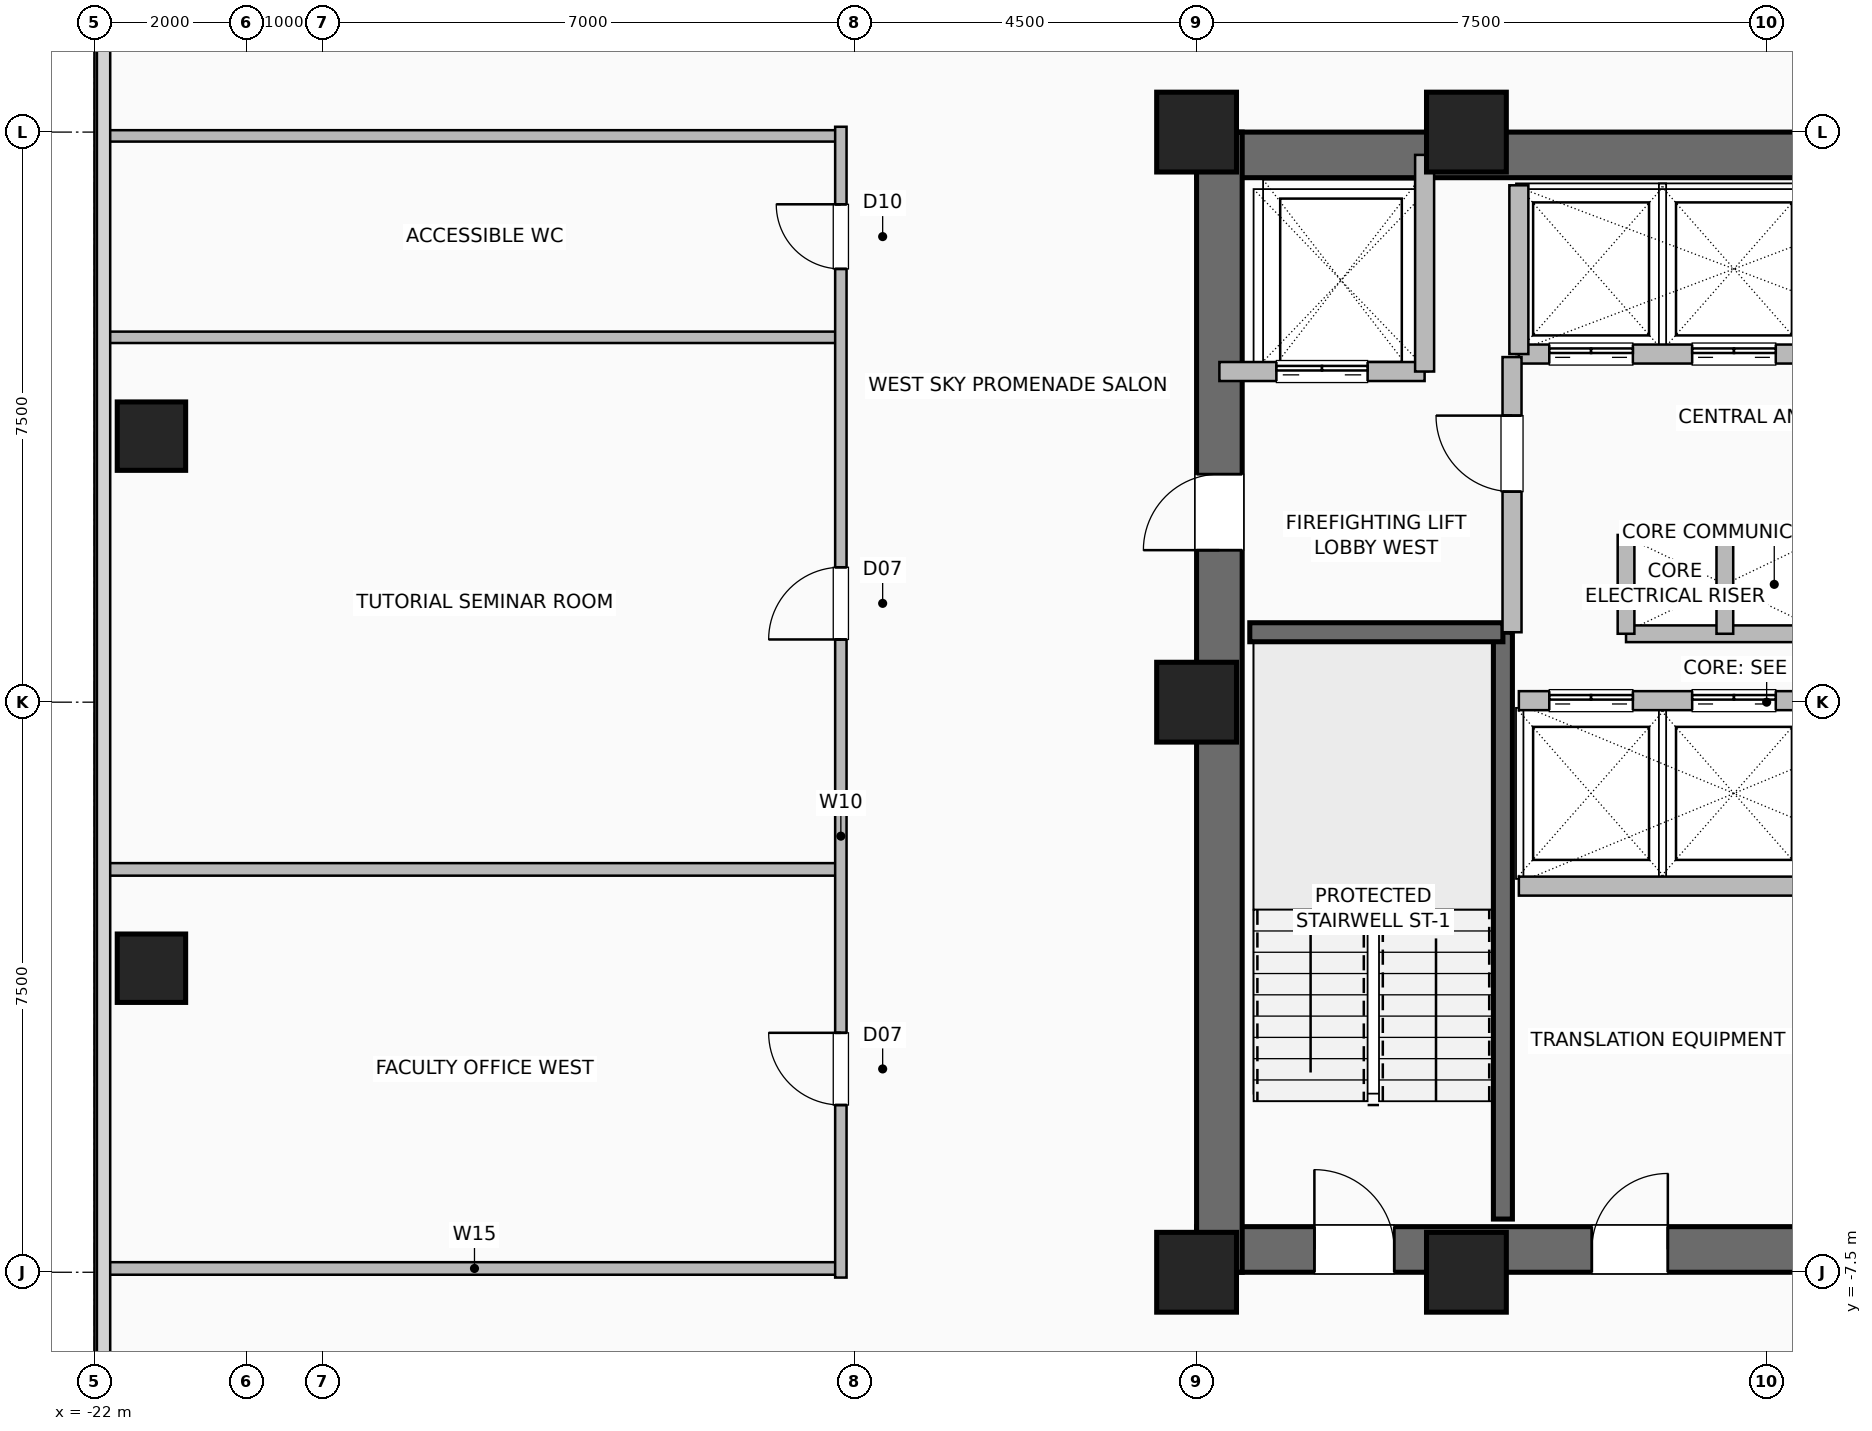
"""IFC4 building model, lengths in metres.
Left out: names, types, materials, properties, quantities, classifications, styles, units other than length and angle.
Written with IfcOpenShell. Run it as: python <this file> out.ifc"""

import sys

from ifc_helpers import new_model, si_unit, direction, frame, frame_2d, origin, origin_2d, place, context, subcontext, project, spatial, rectangle, hollow_rectangle, extrude, element, fill, save


model = new_model("IFC4")
c1 = context("Model", 3, precision=1e-05, world=origin(), true_north=direction((0.0, 1.0)))
c2 = subcontext(c1, "Body", "Model", "MODEL_VIEW")
j1 = project(units=[si_unit("LENGTHUNIT", "METRE"), si_unit("PLANEANGLEUNIT", "RADIAN")], contexts=[c1])
p1 = place(None, origin())
s1 = spatial("IfcSite", under=j1, at=p1, CompositionType="ELEMENT")
p2 = place(p1, origin())
s2 = spatial("IfcBuilding", under=s1, at=p2, CompositionType="ELEMENT")
p3 = place(p2, frame((0.0, 0.0, 133.6)))
s3 = spatial("IfcBuildingStorey", under=s2, at=p3, CompositionType="ELEMENT", Elevation=133.6)
for number, where, z_axis, x_axis in (
    (1, (-7.5, -7.5, 0.0), (0.0, 0.0, 1.0), (1.0, 0.0, 0.0)),
    (2, (-3.95, -7.5, 0.0), (0.0, 0.0, 1.0), (1.0, 0.0, 0.0)),
    (3, (-3.95, 7.5, 0.0), (0.0, 0.0, 1.0), (1.0, 0.0, 0.0)),
    (4, (-7.5, 7.5, 0.0), (0.0, 0.0, 1.0), (1.0, 0.0, 0.0)),
    (5, (-7.5, 0.0, 0.0), (0.0, 0.0, 1.0), (1.0, 0.0, 0.0)),
):
    element("IfcColumn", number, at=place(p3, frame(where, z_axis=z_axis, x_axis=x_axis)), inside=s3, PredefinedType="COLUMN", context=c2, shape_type="SweptSolid", body=[
        extrude(hollow_rectangle(XDim=1.05, YDim=1.05, WallThickness=0.05, at=origin_2d()), origin(), (0.0, 0.0, 1.0), 3.6),
    ])
for number, where, z_axis, x_axis in (
    (6, (-21.25, -3.5, 0.0), (0.0, 0.0, 1.0), (1.0, 0.0, 0.0)),
    (7, (-21.25, 3.5, 0.0), (0.0, 0.0, 1.0), (1.0, 0.0, 0.0)),
):
    element("IfcColumn", number, at=place(p3, frame(where, z_axis=z_axis, x_axis=x_axis)), inside=s3, PredefinedType="COLUMN", context=c2, shape_type="SweptSolid", body=[
        extrude(hollow_rectangle(XDim=0.9, YDim=0.9, WallThickness=0.045, at=origin_2d()), origin(), (0.0, 0.0, 1.0), 3.6),
    ])
p4 = place(p3, frame((-7.5, -7.2, 0.0), z_axis=(0.0, 0.0, 1.0), x_axis=(1.0, 0.0, 0.0)))
e8 = element("IfcWall", 8, at=p4, inside=s3, PredefinedType="SHEAR", context=c2, shape_type="SweptSolid", body=[
    extrude(rectangle(XDim=15.0, YDim=0.6, at=frame_2d((7.5, 0.0))), origin(), (0.0, 0.0, 1.0), 3.36),
])
p5 = place(p4, frame((1.55, 0.0, 0.0)))
e9 = element("IfcOpeningElement", 9, at=p5, cuts=e8, PredefinedType="OPENING", context=c2, shape_type="SweptSolid", body=[
    extrude(rectangle(XDim=1.05, YDim=2.08, at=frame_2d((0.525, 1.04))), frame((0.0, 0.31, 0.0), z_axis=(0.0, -1.0, 0.0), x_axis=(1.0, 0.0, 0.0)), (0.0, 0.0, 1.0), 0.62),
])
p6 = place(p4, frame((12.4, 0.0, 0.0)))
e10 = element("IfcOpeningElement", 10, at=p6, cuts=e8, PredefinedType="OPENING", context=c2, shape_type="SweptSolid", body=[
    extrude(rectangle(XDim=1.05, YDim=2.08, at=frame_2d((0.525, 1.04))), frame((0.0, 0.31, 0.0), z_axis=(0.0, -1.0, 0.0), x_axis=(1.0, 0.0, 0.0)), (0.0, 0.0, 1.0), 0.62),
])
p7 = place(p4, frame((5.2, 0.0, 0.0)))
e11 = element("IfcOpeningElement", 11, at=p7, cuts=e8, PredefinedType="OPENING", context=c2, shape_type="SweptSolid", body=[
    extrude(rectangle(XDim=1.0, YDim=2.08, at=frame_2d((0.5, 1.04))), frame((0.0, 0.31, 0.0), z_axis=(0.0, -1.0, 0.0), x_axis=(1.0, 0.0, 0.0)), (0.0, 0.0, 1.0), 0.62),
])
p8 = place(p4, frame((8.65, 0.0, 0.0)))
e12 = element("IfcOpeningElement", 12, at=p8, cuts=e8, PredefinedType="OPENING", context=c2, shape_type="SweptSolid", body=[
    extrude(rectangle(XDim=1.0, YDim=2.08, at=frame_2d((0.5, 1.04))), frame((0.0, 0.31, 0.0), z_axis=(0.0, -1.0, 0.0), x_axis=(1.0, 0.0, 0.0)), (0.0, 0.0, 1.0), 0.62),
])
p9 = place(p3, frame((-7.5, 7.2, 0.0), z_axis=(0.0, 0.0, 1.0), x_axis=(1.0, 0.0, 0.0)))
e13 = element("IfcWall", 13, at=p9, inside=s3, PredefinedType="SHEAR", context=c2, shape_type="SweptSolid", body=[
    extrude(rectangle(XDim=15.0, YDim=0.6, at=frame_2d((7.5, 0.0))), origin(), (0.0, 0.0, 1.0), 3.36),
])
p10 = place(p3, frame((-7.2, -7.5, 0.0), z_axis=(0.0, 0.0, 1.0), x_axis=(0.0, 1.0, 0.0)))
e14 = element("IfcWall", 14, at=p10, inside=s3, PredefinedType="SHEAR", context=c2, shape_type="SweptSolid", body=[
    extrude(rectangle(XDim=15.0, YDim=0.6, at=frame_2d((7.5, 0.0))), origin(), (0.0, 0.0, 1.0), 3.36),
])
p11 = place(p10, frame((9.5, 0.0, 0.0)))
e15 = element("IfcOpeningElement", 15, at=p11, cuts=e14, PredefinedType="OPENING", context=c2, shape_type="SweptSolid", body=[
    extrude(rectangle(XDim=1.0, YDim=2.08, at=frame_2d((0.5, 1.04))), frame((0.0, 0.31, 0.0), z_axis=(0.0, -1.0, 0.0), x_axis=(1.0, 0.0, 0.0)), (0.0, 0.0, 1.0), 0.62),
])
p12 = place(p3, frame((-3.47, -6.8, 0.0), z_axis=(0.0, 0.0, 1.0), x_axis=(0.0, 1.0, 0.0)))
e16 = element("IfcWall", 16, at=p12, inside=s3, PredefinedType="SHEAR", context=c2, shape_type="SweptSolid", body=[
    extrude(rectangle(XDim=7.72, YDim=0.25, at=frame_2d((3.86, 0.0))), origin(), (0.0, 0.0, 1.0), 3.36),
])
p13 = place(p3, frame((-6.8, 0.92, 0.0), z_axis=(0.0, 0.0, 1.0), x_axis=(1.0, 0.0, 0.0)))
e17 = element("IfcWall", 17, at=p13, inside=s3, PredefinedType="SHEAR", context=c2, shape_type="SweptSolid", body=[
    extrude(rectangle(XDim=3.33, YDim=0.25, at=frame_2d((1.665, 0.0))), origin(), (0.0, 0.0, 1.0), 3.36),
])
for number, where, z_axis, x_axis in (
    (18, (-1.85, 2.2, 0.0), (0.0, 0.0, 1.0), (1.0, 0.0, 0.0)),
    (19, (-1.85, 0.9, 0.0), (0.0, 0.0, 1.0), (1.0, 0.0, 0.0)),
):
    element("IfcWall", number, at=place(p3, frame(where, z_axis=z_axis, x_axis=x_axis)), inside=s3, PredefinedType="PARTITIONING", context=c2, shape_type="SweptSolid", body=[
        extrude(rectangle(XDim=2.6, YDim=0.22, at=frame_2d((1.3, 0.0))), origin(), (0.0, 0.0, 1.0), 3.36),
    ])
for number, where, z_axis, x_axis in (
    (20, (-0.55, 0.9, 0.0), (0.0, 0.0, 1.0), (0.0, 1.0, 0.0)),
    (21, (-1.85, 0.9, 0.0), (0.0, 0.0, 1.0), (0.0, 1.0, 0.0)),
):
    element("IfcWall", number, at=place(p3, frame(where, z_axis=z_axis, x_axis=x_axis)), inside=s3, PredefinedType="PARTITIONING", context=c2, shape_type="SweptSolid", body=[
        extrude(rectangle(XDim=1.3, YDim=0.22, at=frame_2d((0.65, 0.0))), origin(), (0.0, 0.0, 1.0), 3.36),
    ])
p14 = place(p3, frame((-3.26, 0.02, 0.0), z_axis=(0.0, 0.0, 1.0), x_axis=(1.0, 0.0, 0.0)))
e22 = element("IfcWall", 22, at=p14, inside=s3, PredefinedType="SHEAR", context=c2, shape_type="SweptSolid", body=[
    extrude(rectangle(XDim=5.64, YDim=0.25, at=frame_2d((2.82, 0.0))), origin(), (0.0, 0.0, 1.0), 3.36),
])
p15 = place(p14, frame((0.4, 0.0, 0.0)))
e23 = element("IfcOpeningElement", 23, at=p15, cuts=e22, PredefinedType="OPENING", context=c2, shape_type="SweptSolid", body=[
    extrude(rectangle(XDim=1.1, YDim=2.2, at=frame_2d((0.55, 1.1))), frame((0.0, 0.135, 0.0), z_axis=(0.0, -1.0, 0.0), x_axis=(1.0, 0.0, 0.0)), (0.0, 0.0, 1.0), 0.27),
])
p16 = place(p14, frame((2.28, 0.0, 0.0)))
e24 = element("IfcOpeningElement", 24, at=p16, cuts=e22, PredefinedType="OPENING", context=c2, shape_type="SweptSolid", body=[
    extrude(rectangle(XDim=1.1, YDim=2.2, at=frame_2d((0.55, 1.1))), frame((0.0, 0.135, 0.0), z_axis=(0.0, -1.0, 0.0), x_axis=(1.0, 0.0, 0.0)), (0.0, 0.0, 1.0), 0.27),
])
p17 = place(p14, frame((4.16, 0.0, 0.0)))
e25 = element("IfcOpeningElement", 25, at=p17, cuts=e22, PredefinedType="OPENING", context=c2, shape_type="SweptSolid", body=[
    extrude(rectangle(XDim=1.1, YDim=2.2, at=frame_2d((0.55, 1.1))), frame((0.0, 0.135, 0.0), z_axis=(0.0, -1.0, 0.0), x_axis=(1.0, 0.0, 0.0)), (0.0, 0.0, 1.0), 0.27),
])
p18 = place(p3, frame((-3.26, -2.42, 0.0), z_axis=(0.0, 0.0, 1.0), x_axis=(1.0, 0.0, 0.0)))
e26 = element("IfcWall", 26, at=p18, inside=s3, PredefinedType="SHEAR", context=c2, shape_type="SweptSolid", body=[
    extrude(rectangle(XDim=5.64, YDim=0.25, at=frame_2d((2.82, 0.0))), origin(), (0.0, 0.0, 1.0), 3.36),
])
p19 = place(p3, frame((-3.26, 4.58, 0.0), z_axis=(0.0, 0.0, 1.0), x_axis=(1.0, 0.0, 0.0)))
e27 = element("IfcWall", 27, at=p19, inside=s3, PredefinedType="SHEAR", context=c2, shape_type="SweptSolid", body=[
    extrude(rectangle(XDim=5.64, YDim=0.25, at=frame_2d((2.82, 0.0))), origin(), (0.0, 0.0, 1.0), 3.36),
])
p20 = place(p19, frame((0.4, 0.0, 0.0)))
e28 = element("IfcOpeningElement", 28, at=p20, cuts=e27, PredefinedType="OPENING", context=c2, shape_type="SweptSolid", body=[
    extrude(rectangle(XDim=1.1, YDim=2.2, at=frame_2d((0.55, 1.1))), frame((0.0, 0.135, 0.0), z_axis=(0.0, -1.0, 0.0), x_axis=(1.0, 0.0, 0.0)), (0.0, 0.0, 1.0), 0.27),
])
p21 = place(p19, frame((2.28, 0.0, 0.0)))
e29 = element("IfcOpeningElement", 29, at=p21, cuts=e27, PredefinedType="OPENING", context=c2, shape_type="SweptSolid", body=[
    extrude(rectangle(XDim=1.1, YDim=2.2, at=frame_2d((0.55, 1.1))), frame((0.0, 0.135, 0.0), z_axis=(0.0, -1.0, 0.0), x_axis=(1.0, 0.0, 0.0)), (0.0, 0.0, 1.0), 0.27),
])
p22 = place(p19, frame((4.16, 0.0, 0.0)))
e30 = element("IfcOpeningElement", 30, at=p22, cuts=e27, PredefinedType="OPENING", context=c2, shape_type="SweptSolid", body=[
    extrude(rectangle(XDim=1.1, YDim=2.2, at=frame_2d((0.55, 1.1))), frame((0.0, 0.135, 0.0), z_axis=(0.0, -1.0, 0.0), x_axis=(1.0, 0.0, 0.0)), (0.0, 0.0, 1.0), 0.27),
])
p23 = place(p3, frame((-3.26, 4.58, 0.0), z_axis=(0.0, 0.0, 1.0), x_axis=(0.0, 1.0, 0.0)))
e31 = element("IfcWall", 31, at=p23, inside=s3, PredefinedType="SHEAR", context=c2, shape_type="SweptSolid", body=[
    extrude(rectangle(XDim=2.22, YDim=0.25, at=frame_2d((1.11, 0.0))), origin(), (0.0, 0.0, 1.0), 3.36),
])
p24 = place(p3, frame((-7.2, 4.35, 0.0), z_axis=(0.0, 0.0, 1.0), x_axis=(1.0, 0.0, 0.0)))
e32 = element("IfcWall", 32, at=p24, inside=s3, PredefinedType="SHEAR", context=c2, shape_type="SweptSolid", body=[
    extrude(rectangle(XDim=2.7, YDim=0.25, at=frame_2d((1.35, 0.0))), origin(), (0.0, 0.0, 1.0), 3.36),
])
p25 = place(p24, frame((0.75, 0.0, 0.0)))
e33 = element("IfcOpeningElement", 33, at=p25, cuts=e32, PredefinedType="OPENING", context=c2, shape_type="SweptSolid", body=[
    extrude(rectangle(XDim=1.2, YDim=2.2, at=frame_2d((0.6, 1.1))), frame((0.0, 0.135, 0.0), z_axis=(0.0, -1.0, 0.0), x_axis=(1.0, 0.0, 0.0)), (0.0, 0.0, 1.0), 0.27),
])
p26 = place(p3, frame((-4.5, 4.35, 0.0), z_axis=(0.0, 0.0, 1.0), x_axis=(0.0, 1.0, 0.0)))
e34 = element("IfcWall", 34, at=p26, inside=s3, PredefinedType="SHEAR", context=c2, shape_type="SweptSolid", body=[
    extrude(rectangle(XDim=2.85, YDim=0.25, at=frame_2d((1.425, 0.0))), origin(), (0.0, 0.0, 1.0), 3.36),
])
p27 = place(p3, frame((-3.35, 0.92, 0.0), z_axis=(0.0, 0.0, 1.0), x_axis=(0.0, 1.0, 0.0)))
e35 = element("IfcWall", 35, at=p27, inside=s3, PredefinedType="SHEAR", context=c2, shape_type="SweptSolid", body=[
    extrude(rectangle(XDim=3.62, YDim=0.25, at=frame_2d((1.81, 0.0))), origin(), (0.0, 0.0, 1.0), 3.36),
])
p28 = place(p27, frame((1.85, 0.0, 0.0)))
e36 = element("IfcOpeningElement", 36, at=p28, cuts=e35, PredefinedType="OPENING", context=c2, shape_type="SweptSolid", body=[
    extrude(rectangle(XDim=1.0, YDim=2.08, at=frame_2d((0.5, 1.04))), frame((0.0, 0.135, 0.0), z_axis=(0.0, -1.0, 0.0), x_axis=(1.0, 0.0, 0.0)), (0.0, 0.0, 1.0), 0.27),
])
for number, where, z_axis, x_axis in (
    (37, (-21.82, -7.45, 0.0), (0.0, 0.0, 1.0), (1.0, 0.0, 0.0)),
    (38, (-21.82, -2.2, 0.0), (0.0, 0.0, 1.0), (1.0, 0.0, 0.0)),
):
    element("IfcWall", number, at=place(p3, frame(where, z_axis=z_axis, x_axis=x_axis)), inside=s3, PredefinedType="PLUMBINGWALL", context=c2, shape_type="SweptSolid", body=[
        extrude(rectangle(XDim=9.64, YDim=0.165, at=frame_2d((4.82, 0.0))), origin(), (0.0, 0.0, 1.0), 3.36),
    ])
p29 = place(p3, frame((-21.82, 4.8, 0.0), z_axis=(0.0, 0.0, 1.0), x_axis=(1.0, 0.0, 0.0)))
e39 = element("IfcWall", 39, at=p29, inside=s3, PredefinedType="PARTITIONING", context=c2, shape_type="SweptSolid", body=[
    extrude(rectangle(XDim=9.64, YDim=0.15, at=frame_2d((4.82, 0.0))), origin(), (0.0, 0.0, 1.0), 2.928),
])
p30 = place(p3, frame((-21.82, 7.45, 0.0), z_axis=(0.0, 0.0, 1.0), x_axis=(1.0, 0.0, 0.0)))
e40 = element("IfcWall", 40, at=p30, inside=s3, PredefinedType="PARTITIONING", context=c2, shape_type="SweptSolid", body=[
    extrude(rectangle(XDim=9.64, YDim=0.15, at=frame_2d((4.82, 0.0))), origin(), (0.0, 0.0, 1.0), 3.36),
])
p31 = place(p3, frame((-12.18, -7.57, 0.0), z_axis=(0.0, 0.0, 1.0), x_axis=(0.0, 1.0, 0.0)))
e41 = element("IfcWall", 41, at=p31, inside=s3, PredefinedType="PARTITIONING", context=c2, shape_type="SweptSolid", body=[
    extrude(rectangle(XDim=15.14, YDim=0.15, at=frame_2d((7.57, 0.0))), origin(), (0.0, 0.0, 1.0), 3.36),
])
p32 = place(p31, frame((2.27, 0.0, 0.0)))
e42 = element("IfcOpeningElement", 42, at=p32, cuts=e41, PredefinedType="OPENING", context=c2, shape_type="SweptSolid", body=[
    extrude(rectangle(XDim=0.95, YDim=2.06, at=frame_2d((0.475, 1.03))), frame((0.0, 0.085, 0.0), z_axis=(0.0, -1.0, 0.0), x_axis=(1.0, 0.0, 0.0)), (0.0, 0.0, 1.0), 0.17),
])
p33 = place(p31, frame((8.395, 0.0, 0.0)))
e43 = element("IfcOpeningElement", 43, at=p33, cuts=e41, PredefinedType="OPENING", context=c2, shape_type="SweptSolid", body=[
    extrude(rectangle(XDim=0.95, YDim=2.06, at=frame_2d((0.475, 1.03))), frame((0.0, 0.085, 0.0), z_axis=(0.0, -1.0, 0.0), x_axis=(1.0, 0.0, 0.0)), (0.0, 0.0, 1.0), 0.17),
])
p34 = place(p31, frame((13.27, 0.0, 0.0)))
e44 = element("IfcOpeningElement", 44, at=p34, cuts=e41, PredefinedType="OPENING", context=c2, shape_type="SweptSolid", body=[
    extrude(rectangle(XDim=0.85, YDim=2.05, at=frame_2d((0.425, 1.025))), frame((0.0, 0.085, 0.0), z_axis=(0.0, -1.0, 0.0), x_axis=(1.0, 0.0, 0.0)), (0.0, 0.0, 1.0), 0.17),
])
p35 = place(p5, origin())
e45 = element("IfcDoor", 45, at=p35, inside=s3, OperationType="SINGLE_SWING_LEFT", PredefinedType="DOOR", context=c2, shape_type="SweptSolid", body=[
    extrude(rectangle(XDim=1.05, YDim=2.08, at=frame_2d((0.525, 1.04))), frame((0.0, 0.025, 0.0), z_axis=(0.0, -1.0, 0.0), x_axis=(1.0, 0.0, 0.0)), (0.0, 0.0, 1.0), 0.05),
])
fill(e9, e45)
p36 = place(p11, origin())
e46 = element("IfcDoor", 46, at=p36, inside=s3, OperationType="SINGLE_SWING_LEFT", PredefinedType="DOOR", context=c2, shape_type="SweptSolid", body=[
    extrude(rectangle(XDim=1.0, YDim=2.08, at=frame_2d((0.5, 1.04))), frame((0.0, 0.025, 0.0), z_axis=(0.0, -1.0, 0.0), x_axis=(1.0, 0.0, 0.0)), (0.0, 0.0, 1.0), 0.05),
])
fill(e15, e46)
p37 = place(p7, origin())
e47 = element("IfcDoor", 47, at=p37, inside=s3, OperationType="SINGLE_SWING_RIGHT", PredefinedType="DOOR", context=c2, shape_type="SweptSolid", body=[
    extrude(rectangle(XDim=1.0, YDim=2.08, at=frame_2d((0.5, 1.04))), frame((0.0, 0.025, 0.0), z_axis=(0.0, -1.0, 0.0), x_axis=(1.0, 0.0, 0.0)), (0.0, 0.0, 1.0), 0.05),
])
fill(e11, e47)
p38 = place(p15, origin())
e48 = element("IfcDoor", 48, at=p38, inside=s3, OperationType="DOUBLE_DOOR_SLIDING", PredefinedType="DOOR", context=c2, shape_type="SweptSolid", body=[
    extrude(rectangle(XDim=1.1, YDim=2.2, at=frame_2d((0.55, 1.1))), frame((0.0, 0.025, 0.0), z_axis=(0.0, -1.0, 0.0), x_axis=(1.0, 0.0, 0.0)), (0.0, 0.0, 1.0), 0.05),
])
fill(e23, e48)
p39 = place(p16, origin())
e49 = element("IfcDoor", 49, at=p39, inside=s3, OperationType="DOUBLE_DOOR_SLIDING", PredefinedType="DOOR", context=c2, shape_type="SweptSolid", body=[
    extrude(rectangle(XDim=1.1, YDim=2.2, at=frame_2d((0.55, 1.1))), frame((0.0, 0.025, 0.0), z_axis=(0.0, -1.0, 0.0), x_axis=(1.0, 0.0, 0.0)), (0.0, 0.0, 1.0), 0.05),
])
fill(e24, e49)
p40 = place(p20, origin())
e50 = element("IfcDoor", 50, at=p40, inside=s3, OperationType="DOUBLE_DOOR_SLIDING", PredefinedType="DOOR", context=c2, shape_type="SweptSolid", body=[
    extrude(rectangle(XDim=1.1, YDim=2.2, at=frame_2d((0.55, 1.1))), frame((0.0, 0.025, 0.0), z_axis=(0.0, -1.0, 0.0), x_axis=(1.0, 0.0, 0.0)), (0.0, 0.0, 1.0), 0.05),
])
fill(e28, e50)
p41 = place(p21, origin())
e51 = element("IfcDoor", 51, at=p41, inside=s3, OperationType="DOUBLE_DOOR_SLIDING", PredefinedType="DOOR", context=c2, shape_type="SweptSolid", body=[
    extrude(rectangle(XDim=1.1, YDim=2.2, at=frame_2d((0.55, 1.1))), frame((0.0, 0.025, 0.0), z_axis=(0.0, -1.0, 0.0), x_axis=(1.0, 0.0, 0.0)), (0.0, 0.0, 1.0), 0.05),
])
fill(e29, e51)
p42 = place(p25, origin())
e52 = element("IfcDoor", 52, at=p42, inside=s3, OperationType="DOUBLE_DOOR_SLIDING", PredefinedType="DOOR", context=c2, shape_type="SweptSolid", body=[
    extrude(rectangle(XDim=1.2, YDim=2.2, at=frame_2d((0.6, 1.1))), frame((0.0, 0.025, 0.0), z_axis=(0.0, -1.0, 0.0), x_axis=(1.0, 0.0, 0.0)), (0.0, 0.0, 1.0), 0.05),
])
fill(e33, e52)
p43 = place(p28, origin())
e53 = element("IfcDoor", 53, at=p43, inside=s3, OperationType="SINGLE_SWING_RIGHT", PredefinedType="DOOR", context=c2, shape_type="SweptSolid", body=[
    extrude(rectangle(XDim=1.0, YDim=2.08, at=frame_2d((0.5, 1.04))), frame((0.0, 0.025, 0.0), z_axis=(0.0, -1.0, 0.0), x_axis=(1.0, 0.0, 0.0)), (0.0, 0.0, 1.0), 0.05),
])
fill(e36, e53)
p44 = place(p32, origin())
e54 = element("IfcDoor", 54, at=p44, inside=s3, OperationType="SINGLE_SWING_RIGHT", PredefinedType="DOOR", context=c2, shape_type="SweptSolid", body=[
    extrude(rectangle(XDim=0.95, YDim=2.06, at=frame_2d((0.475, 1.03))), frame((0.0, 0.025, 0.0), z_axis=(0.0, -1.0, 0.0), x_axis=(1.0, 0.0, 0.0)), (0.0, 0.0, 1.0), 0.05),
])
fill(e42, e54)
p45 = place(p33, origin())
e55 = element("IfcDoor", 55, at=p45, inside=s3, OperationType="SINGLE_SWING_LEFT", PredefinedType="DOOR", context=c2, shape_type="SweptSolid", body=[
    extrude(rectangle(XDim=0.95, YDim=2.06, at=frame_2d((0.475, 1.03))), frame((0.0, 0.025, 0.0), z_axis=(0.0, -1.0, 0.0), x_axis=(1.0, 0.0, 0.0)), (0.0, 0.0, 1.0), 0.05),
])
fill(e43, e55)
p46 = place(p34, origin())
e56 = element("IfcDoor", 56, at=p46, inside=s3, OperationType="SINGLE_SWING_RIGHT", PredefinedType="DOOR", context=c2, shape_type="SweptSolid", body=[
    extrude(rectangle(XDim=0.85, YDim=2.05, at=frame_2d((0.425, 1.025))), frame((0.0, 0.025, 0.0), z_axis=(0.0, -1.0, 0.0), x_axis=(1.0, 0.0, 0.0)), (0.0, 0.0, 1.0), 0.05),
])
fill(e44, e56)
save(model, sys.argv[1])
